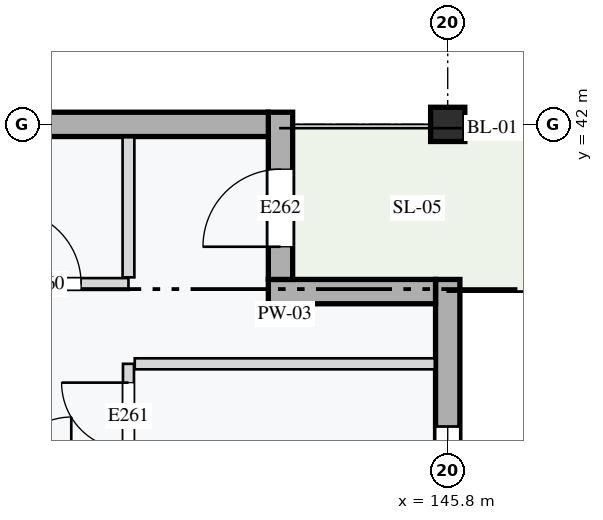
"""IFC4 building model, lengths in metres.
Left out: names, types, materials, properties, quantities, classifications, styles, units other than length and angle.
Written with IfcOpenShell. Run it as: python <this file> out.ifc"""

import sys

from ifc_helpers import new_model, si_unit, direction, frame, frame_2d, origin, origin_2d, place, context, subcontext, project, spatial, rectangle, extrude, element, fill, save


model = new_model("IFC4")
c1 = context("Model", 3, precision=1e-05, world=origin(), true_north=direction((0.0, 1.0)))
c2 = subcontext(c1, "Body", "Model", "MODEL_VIEW")
j1 = project(units=[si_unit("LENGTHUNIT", "METRE"), si_unit("PLANEANGLEUNIT", "RADIAN")], contexts=[c1])
p1 = place(None, origin())
s1 = spatial("IfcSite", under=j1, at=p1, CompositionType="ELEMENT")
p2 = place(p1, origin())
s2 = spatial("IfcBuilding", under=s1, at=p2, CompositionType="ELEMENT")
p3 = place(p2, frame((0.0, 0.0, 18.0)))
s3 = spatial("IfcBuildingStorey", under=s2, at=p3, CompositionType="ELEMENT", Elevation=18.0)
p4 = place(p3, frame((145.8, 42.0, 0.0), z_axis=(0.0, 0.0, 1.0), x_axis=(1.0, 0.0, 0.0)))
e1 = element("IfcColumn", 1, at=p4, inside=s3, PredefinedType="COLUMN", context=c2, shape_type="SweptSolid", body=[
    extrude(rectangle(XDim=0.45, YDim=0.45, at=origin_2d()), origin(), (0.0, 0.0, 1.0), 3.2),
])
p5 = place(p3, frame((145.8, 35.625, 0.0), z_axis=(0.0, 0.0, 1.0), x_axis=(0.0, 1.0, 0.0)))
e2 = element("IfcWall", 2, at=p5, inside=s3, PredefinedType="STANDARD", context=c2, shape_type="SweptSolid", body=[
    extrude(rectangle(XDim=4.335, YDim=0.32, at=frame_2d((2.167, 0.0))), origin(), (0.0, 0.0, 1.0), 2.65),
])
p6 = place(p5, frame((0.6, 0.0, 0.85)))
e3 = element("IfcOpeningElement", 3, at=p6, cuts=e2, PredefinedType="OPENING", context=c2, shape_type="SweptSolid", body=[
    extrude(rectangle(XDim=1.8, YDim=1.35, at=frame_2d((0.9, 0.675))), frame((0.0, 0.17, 0.0), z_axis=(0.0, -1.0, 0.0), x_axis=(1.0, 0.0, 0.0)), (0.0, 0.0, 1.0), 0.34),
])
p7 = place(p3, frame((145.64, 39.8, 0.0), z_axis=(0.0, 0.0, 1.0), x_axis=(-1.0, 0.0, 0.0)))
e4 = element("IfcWall", 4, at=p7, inside=s3, PredefinedType="STANDARD", context=c2, shape_type="SweptSolid", body=[
    extrude(rectangle(XDim=2.2, YDim=0.32, at=frame_2d((1.1, 0.0))), origin(), (0.0, 0.0, 1.0), 2.96),
])
p8 = place(p3, frame((143.6, 39.96, 0.0), z_axis=(0.0, 0.0, 1.0), x_axis=(0.0, 1.0, 0.0)))
e5 = element("IfcWall", 5, at=p8, inside=s3, PredefinedType="STANDARD", context=c2, shape_type="SweptSolid", body=[
    extrude(rectangle(XDim=2.2, YDim=0.32, at=frame_2d((1.1, 0.0))), origin(), (0.0, 0.0, 1.0), 2.96),
])
p9 = place(p8, frame((0.43, 0.0, 0.0)))
e6 = element("IfcOpeningElement", 6, at=p9, cuts=e5, PredefinedType="OPENING", context=c2, shape_type="SweptSolid", body=[
    extrude(rectangle(XDim=1.02, YDim=2.16, at=frame_2d((0.51, 1.08))), frame((0.0, 0.17, 0.0), z_axis=(0.0, -1.0, 0.0), x_axis=(1.0, 0.0, 0.0)), (0.0, 0.0, 1.0), 0.34),
])
p10 = place(p3, frame((139.425, 42.0, 0.0), z_axis=(0.0, 0.0, 1.0), x_axis=(1.0, 0.0, 0.0)))
e7 = element("IfcWall", 7, at=p10, inside=s3, PredefinedType="STANDARD", context=c2, shape_type="SweptSolid", body=[
    extrude(rectangle(XDim=4.015, YDim=0.32, at=frame_2d((2.007, 0.0))), origin(), (0.0, 0.0, 1.0), 2.65),
])
p11 = place(p3, frame((139.298, 39.9, 0.0), z_axis=(0.0, 0.0, 1.0), x_axis=(1.0, 0.0, 0.0)))
e8 = element("IfcWall", 8, at=p11, inside=s3, PredefinedType="PARTITIONING", context=c2, shape_type="SweptSolid", body=[
    extrude(rectangle(XDim=2.302, YDim=0.155, at=frame_2d((1.151, 0.0))), origin(), (0.0, 0.0, 1.0), 2.96),
])
p12 = place(p11, frame((0.7, 0.0, 0.0)))
e9 = element("IfcOpeningElement", 9, at=p12, cuts=e8, PredefinedType="OPENING", context=c2, shape_type="SweptSolid", body=[
    extrude(rectangle(XDim=0.98, YDim=2.12, at=frame_2d((0.49, 1.06))), frame((0.0, 0.087, 0.0), z_axis=(0.0, -1.0, 0.0), x_axis=(1.0, 0.0, 0.0)), (0.0, 0.0, 1.0), 0.175),
])
p13 = place(p3, frame((141.6, 39.988, 0.0), z_axis=(0.0, 0.0, 1.0), x_axis=(0.0, 1.0, 0.0)))
e10 = element("IfcWall", 10, at=p13, inside=s3, PredefinedType="PARTITIONING", context=c2, shape_type="SweptSolid", body=[
    extrude(rectangle(XDim=1.843, YDim=0.155, at=frame_2d((0.921, 0.0))), origin(), (0.0, 0.0, 1.0), 2.96),
])
p14 = place(p3, frame((141.6, 37.373, 0.0), z_axis=(0.0, 0.0, 1.0), x_axis=(0.0, 1.0, 0.0)))
e11 = element("IfcWall", 11, at=p14, inside=s3, PredefinedType="PARTITIONING", context=c2, shape_type="SweptSolid", body=[
    extrude(rectangle(XDim=1.478, YDim=0.145, at=frame_2d((0.739, 0.0))), origin(), (0.0, 0.0, 1.0), 2.96),
])
p15 = place(p14, frame((0.35, 0.0, 0.0)))
e12 = element("IfcOpeningElement", 12, at=p15, cuts=e11, PredefinedType="OPENING", context=c2, shape_type="SweptSolid", body=[
    extrude(rectangle(XDim=0.88, YDim=2.1, at=frame_2d((0.44, 1.05))), frame((0.0, 0.083, 0.0), z_axis=(0.0, -1.0, 0.0), x_axis=(1.0, 0.0, 0.0)), (0.0, 0.0, 1.0), 0.165),
])
p16 = place(p3, frame((141.683, 38.85, 0.0), z_axis=(0.0, 0.0, 1.0), x_axis=(1.0, 0.0, 0.0)))
e13 = element("IfcWall", 13, at=p16, inside=s3, PredefinedType="PARTITIONING", context=c2, shape_type="SweptSolid", body=[
    extrude(rectangle(XDim=3.947, YDim=0.145, at=frame_2d((1.974, 0.0))), origin(), (0.0, 0.0, 1.0), 2.96),
])
p17 = place(p6, origin())
e14 = element("IfcWindow", 14, at=p17, inside=s3, PartitioningType="SINGLE_PANEL", PredefinedType="WINDOW", context=c2, shape_type="SweptSolid", body=[
    extrude(rectangle(XDim=1.8, YDim=1.35, at=frame_2d((0.9, 0.675))), frame((0.0, 0.03, 0.0), z_axis=(0.0, -1.0, 0.0), x_axis=(1.0, 0.0, 0.0)), (0.0, 0.0, 1.0), 0.06),
])
fill(e3, e14)
p18 = place(p9, origin())
e15 = element("IfcDoor", 15, at=p18, inside=s3, OperationType="SINGLE_SWING_LEFT", PredefinedType="DOOR", context=c2, shape_type="SweptSolid", body=[
    extrude(rectangle(XDim=1.02, YDim=2.16, at=frame_2d((0.51, 1.08))), frame((0.0, 0.025, 0.0), z_axis=(0.0, -1.0, 0.0), x_axis=(1.0, 0.0, 0.0)), (0.0, 0.0, 1.0), 0.05),
])
fill(e6, e15)
p19 = place(p12, origin())
e16 = element("IfcDoor", 16, at=p19, inside=s3, OperationType="SINGLE_SWING_LEFT", PredefinedType="DOOR", context=c2, shape_type="SweptSolid", body=[
    extrude(rectangle(XDim=0.98, YDim=2.12, at=frame_2d((0.49, 1.06))), frame((0.0, 0.025, 0.0), z_axis=(0.0, -1.0, 0.0), x_axis=(1.0, 0.0, 0.0)), (0.0, 0.0, 1.0), 0.05),
])
fill(e9, e16)
p20 = place(p15, origin())
e17 = element("IfcDoor", 17, at=p20, inside=s3, OperationType="SINGLE_SWING_RIGHT", PredefinedType="DOOR", context=c2, shape_type="SweptSolid", body=[
    extrude(rectangle(XDim=0.88, YDim=2.1, at=frame_2d((0.44, 1.05))), frame((0.0, 0.025, 0.0), z_axis=(0.0, -1.0, 0.0), x_axis=(1.0, 0.0, 0.0)), (0.0, 0.0, 1.0), 0.05),
])
fill(e12, e17)
save(model, sys.argv[1])
